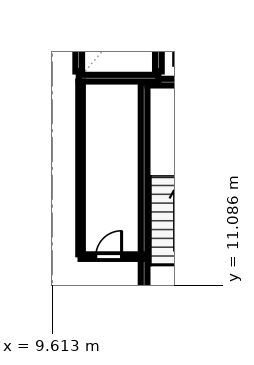
"""IFC4 building model, lengths in metres.
Left out: names, types, materials, properties, quantities, classifications, styles, units other than length and angle.
Written with IfcOpenShell. Run it as: python <this file> out.ifc"""

import sys

from ifc_helpers import new_model, si_unit, direction, frame, frame_2d, origin, place, context, subcontext, project, spatial, rectangle, extrude, element, fill, save


model = new_model("IFC4")
c1 = context("Model", 3, precision=1e-05, world=origin(), true_north=direction((0.0, 1.0)))
c2 = subcontext(c1, "Body", "Model", "MODEL_VIEW")
j1 = project(units=[si_unit("LENGTHUNIT", "METRE"), si_unit("PLANEANGLEUNIT", "RADIAN")], contexts=[c1])
p1 = place(None, origin())
s1 = spatial("IfcSite", under=j1, at=p1, CompositionType="ELEMENT")
p2 = place(p1, origin())
s2 = spatial("IfcBuilding", under=s1, at=p2, CompositionType="ELEMENT")
p3 = place(p2, frame((0.0, 0.0, 39.4)))
s3 = spatial("IfcBuildingStorey", under=s2, at=p3, CompositionType="ELEMENT", Elevation=39.4)
p4 = place(p3, frame((12.64, 10.05, 0.0), z_axis=(0.0, 0.0, 1.0), x_axis=(0.0, 1.0, 0.0)))
e1 = element("IfcWall", 1, at=p4, inside=s3, PredefinedType="SOLIDWALL", context=c2, shape_type="SweptSolid", body=[
    extrude(rectangle(XDim=7.71, YDim=0.22, at=frame_2d((3.855, 0.0))), origin(), (0.0, 0.0, 1.0), 3.54),
])
p5 = place(p3, frame((12.75, 17.76, 0.0), z_axis=(0.0, 0.0, 1.0), x_axis=(1.0, 0.0, 0.0)))
e2 = element("IfcWall", 2, at=p5, inside=s3, PredefinedType="SOLIDWALL", context=c2, shape_type="SweptSolid", body=[
    extrude(rectangle(XDim=3.6, YDim=0.22, at=frame_2d((1.8, 0.0))), origin(), (0.0, 0.0, 1.0), 3.54),
])
for number, where, z_axis, x_axis in (
    (3, (10.49, 18.11, 0.0), (0.0, 0.0, 1.0), (0.0, 1.0, 0.0)),
    (4, (13.11, 18.11, 0.0), (0.0, 0.0, 1.0), (0.0, 1.0, 0.0)),
):
    element("IfcWall", number, at=place(p3, frame(where, z_axis=z_axis, x_axis=x_axis)), inside=s3, PredefinedType="SOLIDWALL", context=c2, shape_type="SweptSolid", body=[
        extrude(rectangle(XDim=2.58, YDim=0.22, at=frame_2d((1.29, 0.0))), origin(), (0.0, 0.0, 1.0), 3.54),
    ])
p6 = place(p3, frame((10.49, 17.89, 0.0), z_axis=(0.0, 0.0, 1.0), x_axis=(1.0, 0.0, 0.0)))
e5 = element("IfcWall", 5, at=p6, inside=s3, PredefinedType="SOLIDWALL", context=c2, shape_type="SweptSolid", body=[
    extrude(rectangle(XDim=2.62, YDim=0.22, at=frame_2d((1.31, 0.0))), origin(), (0.0, 0.0, 1.0), 3.54),
])
p7 = place(p3, frame((10.55, 12.02, 0.0), z_axis=(0.0, 0.0, 1.0), x_axis=(1.0, 0.0, 0.0)))
e6 = element("IfcWall", 6, at=p7, inside=s3, PredefinedType="PARTITIONING", context=c2, shape_type="SweptSolid", body=[
    extrude(rectangle(XDim=2.08, YDim=0.15, at=frame_2d((1.04, 0.0))), origin(), (0.0, 0.0, 1.0), 3.54),
])
p8 = place(p7, frame((0.5, 0.0, 0.0)))
e7 = element("IfcOpeningElement", 7, at=p8, cuts=e6, PredefinedType="OPENING", context=c2, shape_type="SweptSolid", body=[
    extrude(rectangle(XDim=0.85, YDim=2.1, at=frame_2d((0.425, 1.05))), frame((0.0, 0.087, 0.0), z_axis=(0.0, -1.0, 0.0), x_axis=(1.0, 0.0, 0.0)), (0.0, 0.0, 1.0), 0.174),
])
p9 = place(p3, frame((10.55, 12.095, 0.0), z_axis=(0.0, 0.0, 1.0), x_axis=(0.0, 1.0, 0.0)))
e8 = element("IfcWall", 8, at=p9, inside=s3, PredefinedType="PARTITIONING", context=c2, shape_type="SweptSolid", body=[
    extrude(rectangle(XDim=5.68, YDim=0.15, at=frame_2d((2.84, 0.0))), origin(), (0.0, 0.0, 1.0), 3.54),
])
p10 = place(p8, origin())
e9 = element("IfcDoor", 9, at=p10, inside=s3, OperationType="SINGLE_SWING_RIGHT", PredefinedType="DOOR", context=c2, shape_type="SweptSolid", body=[
    extrude(rectangle(XDim=0.85, YDim=2.1, at=frame_2d((0.425, 1.05))), frame((0.0, 0.025, 0.0), z_axis=(0.0, -1.0, 0.0), x_axis=(1.0, 0.0, 0.0)), (0.0, 0.0, 1.0), 0.05),
])
fill(e7, e9)
save(model, sys.argv[1])
